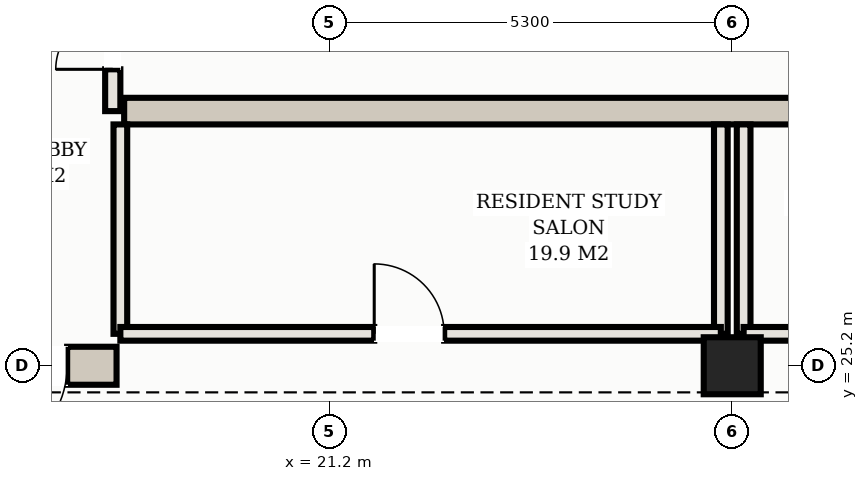
"""IFC4 building model, lengths in metres.
Left out: names, types, materials, properties, quantities, classifications, styles, units other than length and angle.
Written with IfcOpenShell. Run it as: python <this file> out.ifc"""

import sys

from ifc_helpers import new_model, si_unit, direction, frame, frame_2d, origin, origin_2d, place, context, subcontext, project, spatial, rectangle, hollow_rectangle, extrude, element, fill, save


model = new_model("IFC4")
c1 = context("Model", 3, precision=1e-05, world=origin(), true_north=direction((0.0, 1.0)))
c2 = subcontext(c1, "Body", "Model", "MODEL_VIEW")
j1 = project(units=[si_unit("LENGTHUNIT", "METRE"), si_unit("PLANEANGLEUNIT", "RADIAN")], contexts=[c1])
p1 = place(None, origin())
s1 = spatial("IfcSite", under=j1, at=p1, CompositionType="ELEMENT")
p2 = place(p1, origin())
s2 = spatial("IfcBuilding", under=s1, at=p2, CompositionType="ELEMENT")
p3 = place(p2, frame((0.0, 0.0, 216.5)))
s3 = spatial("IfcBuildingStorey", under=s2, at=p3, CompositionType="ELEMENT", Elevation=216.5)
p4 = place(p3, frame((10.35, 25.2, 0.0), z_axis=(0.0, 0.0, 1.0), x_axis=(1.0, 0.0, 0.0)))
e1 = element("IfcWall", 1, at=p4, inside=s3, PredefinedType="SHEAR", context=c2, shape_type="SweptSolid", body=[
    extrude(rectangle(XDim=8.05, YDim=0.5, at=frame_2d((4.025, 0.0))), origin(), (0.0, 0.0, 1.0), 3.11),
])
p5 = place(p4, frame((6.15, 0.0, 0.0)))
e2 = element("IfcOpeningElement", 2, at=p5, cuts=e1, PredefinedType="OPENING", context=c2, shape_type="SweptSolid", body=[
    extrude(rectangle(XDim=1.25, YDim=2.2, at=frame_2d((0.625, 1.1))), frame((0.0, 0.26, 0.0), z_axis=(0.0, -1.0, 0.0), x_axis=(1.0, 0.0, 0.0)), (0.0, 0.0, 1.0), 0.52),
])
p6 = place(p3, frame((18.5, 28.55, 0.0), z_axis=(0.0, 0.0, 1.0), x_axis=(1.0, 0.0, 0.0)))
e3 = element("IfcWall", 3, at=p6, inside=s3, PredefinedType="SHEAR", context=c2, shape_type="SweptSolid", body=[
    extrude(rectangle(XDim=16.0, YDim=0.35, at=frame_2d((8.0, 0.0))), origin(), (0.0, 0.0, 1.0), 3.11),
])
p7 = place(p3, frame((26.5, 25.2, 0.0), z_axis=(0.0, 0.0, 1.0), x_axis=(1.0, 0.0, 0.0)))
e4 = element("IfcColumn", 4, at=p7, inside=s3, PredefinedType="COLUMN", context=c2, shape_type="SweptSolid", body=[
    extrude(hollow_rectangle(XDim=0.75, YDim=0.75, WallThickness=0.025, at=origin_2d()), origin(), (0.0, 0.0, 1.0), 3.3),
])
p8 = place(p3, frame((18.35, 28.55, 0.0), z_axis=(0.0, 0.0, 1.0), x_axis=(0.0, 1.0, 0.0)))
e5 = element("IfcWall", 5, at=p8, inside=s3, PredefinedType="PARTITIONING", context=c2, shape_type="SweptSolid", body=[
    extrude(rectangle(XDim=2.6, YDim=0.2, at=frame_2d((1.3, 0.0))), origin(), (0.0, 0.0, 1.0), 2.43),
])
p9 = place(p8, frame((0.55, 0.0, 0.0)))
e6 = element("IfcOpeningElement", 6, at=p9, cuts=e5, PredefinedType="OPENING", context=c2, shape_type="SweptSolid", body=[
    extrude(rectangle(XDim=1.5, YDim=2.25, at=frame_2d((0.75, 1.125))), frame((0.0, 0.11, 0.0), z_axis=(0.0, -1.0, 0.0), x_axis=(1.0, 0.0, 0.0)), (0.0, 0.0, 1.0), 0.22),
])
for number, where, z_axis, x_axis in (
    (7, (18.45, 25.62, 0.0), (0.0, 0.0, 1.0), (0.0, 1.0, 0.0)),
    (8, (26.35, 25.62, 0.0), (0.0, 0.0, 1.0), (0.0, 1.0, 0.0)),
):
    element("IfcWall", number, at=place(p3, frame(where, z_axis=z_axis, x_axis=x_axis)), inside=s3, PredefinedType="PARTITIONING", context=c2, shape_type="SweptSolid", body=[
        extrude(rectangle(XDim=2.755, YDim=0.18, at=frame_2d((1.377, 0.0))), origin(), (0.0, 0.0, 1.0), 2.43),
    ])
p10 = place(p3, frame((18.45, 25.62, 0.0), z_axis=(0.0, 0.0, 1.0), x_axis=(1.0, 0.0, 0.0)))
e9 = element("IfcWall", 9, at=p10, inside=s3, PredefinedType="PARTITIONING", context=c2, shape_type="SweptSolid", body=[
    extrude(rectangle(XDim=7.9, YDim=0.18, at=frame_2d((3.95, 0.0))), origin(), (0.0, 0.0, 1.0), 2.43),
])
p11 = place(p10, frame((3.34, 0.0, 0.0)))
e10 = element("IfcOpeningElement", 10, at=p11, cuts=e9, PredefinedType="OPENING", context=c2, shape_type="SweptSolid", body=[
    extrude(rectangle(XDim=0.92, YDim=2.15, at=frame_2d((0.46, 1.075))), frame((0.0, 0.1, 0.0), z_axis=(0.0, -1.0, 0.0), x_axis=(1.0, 0.0, 0.0)), (0.0, 0.0, 1.0), 0.2),
])
p12 = place(p3, frame((26.65, 25.62, 0.0), z_axis=(0.0, 0.0, 1.0), x_axis=(0.0, 1.0, 0.0)))
e11 = element("IfcWall", 11, at=p12, inside=s3, PredefinedType="PARTITIONING", context=c2, shape_type="SweptSolid", body=[
    extrude(rectangle(XDim=2.755, YDim=0.18, at=frame_2d((1.377, 0.0))), origin(), (0.0, 0.0, 1.0), 2.43),
])
p13 = place(p3, frame((26.65, 25.62, 0.0), z_axis=(0.0, 0.0, 1.0), x_axis=(1.0, 0.0, 0.0)))
e12 = element("IfcWall", 12, at=p13, inside=s3, PredefinedType="PARTITIONING", context=c2, shape_type="SweptSolid", body=[
    extrude(rectangle(XDim=7.9, YDim=0.18, at=frame_2d((3.95, 0.0))), origin(), (0.0, 0.0, 1.0), 2.43),
])
p14 = place(p13, frame((3.34, 0.0, 0.0)))
e13 = element("IfcOpeningElement", 13, at=p14, cuts=e12, PredefinedType="OPENING", context=c2, shape_type="SweptSolid", body=[
    extrude(rectangle(XDim=0.92, YDim=2.15, at=frame_2d((0.46, 1.075))), frame((0.0, 0.1, 0.0), z_axis=(0.0, -1.0, 0.0), x_axis=(1.0, 0.0, 0.0)), (0.0, 0.0, 1.0), 0.2),
])
p15 = place(p5, frame((1.25, 0.0, 0.0), z_axis=(0.0, 0.0, 1.0), x_axis=(-1.0, 0.0, 0.0)))
e14 = element("IfcDoor", 14, at=p15, inside=s3, OperationType="SINGLE_SWING_RIGHT", PredefinedType="DOOR", context=c2, shape_type="SweptSolid", body=[
    extrude(rectangle(XDim=1.25, YDim=2.2, at=frame_2d((0.625, 1.1))), frame((0.0, 0.025, 0.0), z_axis=(0.0, -1.0, 0.0), x_axis=(1.0, 0.0, 0.0)), (0.0, 0.0, 1.0), 0.05),
])
fill(e2, e14)
p16 = place(p9, origin())
e15 = element("IfcDoor", 15, at=p16, inside=s3, OperationType="DOUBLE_DOOR_SINGLE_SWING", PredefinedType="DOOR", context=c2, shape_type="SweptSolid", body=[
    extrude(rectangle(XDim=1.5, YDim=2.25, at=frame_2d((0.75, 1.125))), frame((0.0, 0.025, 0.0), z_axis=(0.0, -1.0, 0.0), x_axis=(1.0, 0.0, 0.0)), (0.0, 0.0, 1.0), 0.05),
])
fill(e6, e15)
p17 = place(p11, origin())
e16 = element("IfcDoor", 16, at=p17, inside=s3, OperationType="SINGLE_SWING_LEFT", PredefinedType="DOOR", context=c2, shape_type="SweptSolid", body=[
    extrude(rectangle(XDim=0.92, YDim=2.15, at=frame_2d((0.46, 1.075))), frame((0.0, 0.025, 0.0), z_axis=(0.0, -1.0, 0.0), x_axis=(1.0, 0.0, 0.0)), (0.0, 0.0, 1.0), 0.05),
])
fill(e10, e16)
save(model, sys.argv[1])
